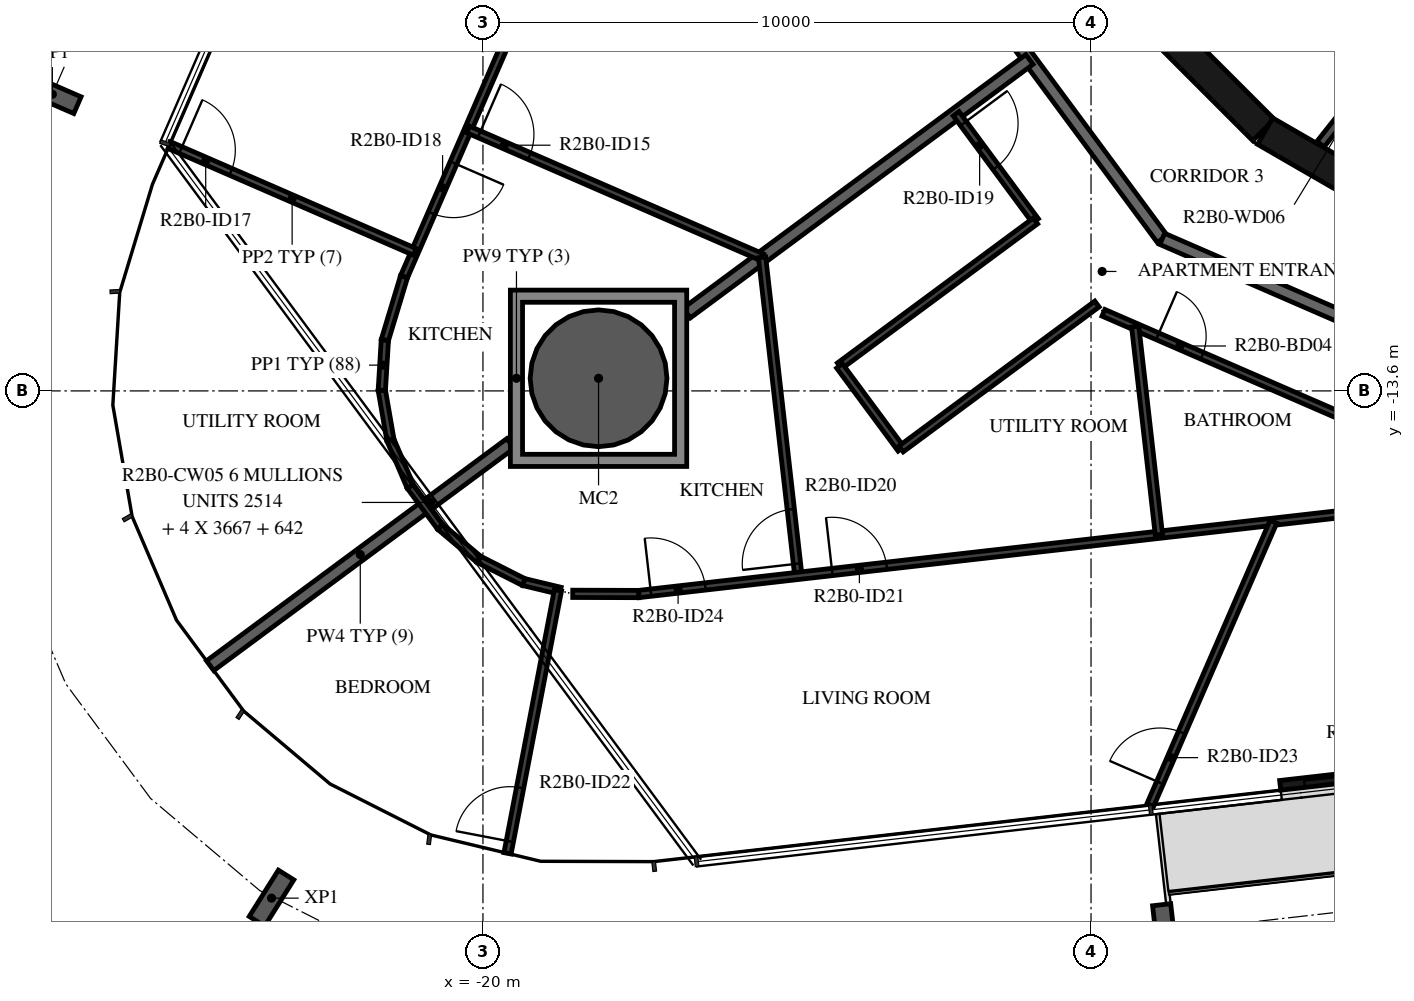
"""IFC4 building model, lengths in metres.
Left out: names, types, materials, properties, quantities, classifications, styles, units other than length and angle.
Written with IfcOpenShell. Run it as: python <this file> out.ifc"""

import sys

from ifc_helpers import new_model, si_unit, direction, frame, frame_2d, origin, origin_2d, place, context, subcontext, project, spatial, polyline, rectangle, hollow_circle, i_section, outline, extrude, element, fill, save


model = new_model("IFC4")
c1 = context("Model", 3, precision=1e-05, world=origin(), true_north=direction((0.0, 1.0)))
c2 = subcontext(c1, "Body", "Model", "MODEL_VIEW")
j1 = project(units=[si_unit("LENGTHUNIT", "METRE"), si_unit("PLANEANGLEUNIT", "RADIAN")], contexts=[c1])
p1 = place(None, origin())
s1 = spatial("IfcSite", under=j1, at=p1, CompositionType="ELEMENT")
p2 = place(p1, origin())
s2 = spatial("IfcBuilding", under=s1, at=p2, CompositionType="ELEMENT")
p3 = place(p2, frame((0.0, 0.0, 90.7)))
s3 = spatial("IfcBuildingStorey", under=s2, at=p3, CompositionType="ELEMENT", Elevation=90.7)
p4 = place(p3, frame((-18.099, -13.393, -0.38), z_axis=(0.0, 0.0, 1.0), x_axis=(1.0, 0.0, 0.0)))
e1 = element("IfcColumn", 1, at=p4, inside=s3, PredefinedType="COLUMN", context=c2, shape_type="SweptSolid", body=[
    extrude(hollow_circle(Radius=1.125, WallThickness=0.055, at=origin_2d()), origin(), (0.0, 0.0, 1.0), 3.5),
])
for number, where, z_axis, x_axis in (
    (2, (-27.081, -8.722, -0.38), (0.0, 0.0, 1.0), (0.399, 0.917, 0.0)),
    (3, (-23.477, -21.941, -0.38), (0.0, 0.0, 1.0), (-0.846, 0.532, 0.0)),
    (4, (-8.788, -22.497, -0.38), (0.0, 0.0, 1.0), (-0.994, -0.113, 0.0)),
):
    element("IfcColumn", number, at=place(p3, frame(where, z_axis=z_axis, x_axis=x_axis)), inside=s3, PredefinedType="COLUMN", context=c2, shape_type="SweptSolid", body=[
        extrude(i_section(OverallWidth=0.3, OverallDepth=0.9, WebThickness=0.019, FlangeThickness=0.035, FilletRadius=0.03, at=origin_2d()), origin(), (0.0, 0.0, 1.0), 3.5),
    ])
p5 = place(p3, frame((-6.889, -20.086, 0.0), z_axis=(0.0, 0.0, 1.0), x_axis=(0.993578576686, 0.113144208648, 0.0)))
e5 = element("IfcWall", 5, at=p5, inside=s3, PredefinedType="STANDARD", context=c2, shape_type="SweptSolid", body=[
    extrude(rectangle(XDim=3.2, YDim=0.16, at=frame_2d((1.6, 0.0))), origin(), (0.0, 0.0, 1.0), 3.12),
])
p6 = place(p5, frame((0.4, 0.0, 0.0)))
e6 = element("IfcOpeningElement", 6, at=p6, cuts=e5, PredefinedType="OPENING", context=c2, shape_type="SweptSolid", body=[
    extrude(rectangle(XDim=2.4, YDim=2.4, at=frame_2d((1.2, 1.2))), frame((0.0, 0.09, 0.0), z_axis=(0.0, -1.0, 0.0), x_axis=(1.0, 0.0, 0.0)), (0.0, 0.0, 1.0), 0.18),
])
p7 = place(p3, frame((-9.308, -7.164, 0.0), z_axis=(0.0, 0.0, 1.0), x_axis=(0.707106781187, -0.707106781187, 0.0)))
e7 = element("IfcWall", 7, at=p7, inside=s3, PredefinedType="SHEAR", context=c2, shape_type="SweptSolid", body=[
    extrude(rectangle(XDim=3.032, YDim=0.5, at=frame_2d((1.516, 0.0))), origin(), (0.0, 0.0, 1.0), 3.12),
])
p8 = place(p3, frame((-7.137, -9.329, 0.0), z_axis=(0.0, 0.0, 1.0), x_axis=(0.865975092491, -0.500087131594, 0.0)))
e8 = element("IfcWall", 8, at=p8, inside=s3, PredefinedType="SHEAR", context=c2, shape_type="SweptSolid", body=[
    extrude(rectangle(XDim=3.033, YDim=0.5, at=frame_2d((1.516, 0.0))), origin(), (0.0, 0.0, 1.0), 3.12),
])
p9 = place(p3, frame((-4.706, -7.625, 0.0), z_axis=(0.0, 0.0, 1.0), x_axis=(-0.621392599334, -0.783499353856, 0.0)))
e9 = element("IfcWall", 9, at=p9, inside=s3, PredefinedType="PARTITIONING", context=c2, shape_type="SweptSolid", body=[
    extrude(rectangle(XDim=2.447, YDim=0.15, at=frame_2d((1.224, 0.0))), origin(), (0.0, 0.0, 1.0), 3.12),
])
p10 = place(p9, frame((0.774, 0.0, 0.0)))
e10 = element("IfcOpeningElement", 10, at=p10, cuts=e9, PredefinedType="OPENING", context=c2, shape_type="SweptSolid", body=[
    extrude(rectangle(XDim=0.9, YDim=2.1, at=frame_2d((0.45, 1.05))), frame((0.0, 0.085, 0.0), z_axis=(0.0, -1.0, 0.0), x_axis=(1.0, 0.0, 0.0)), (0.0, 0.0, 1.0), 0.17),
])
p11 = place(p3, frame((-13.196, -5.198, 0.0), z_axis=(0.0, 0.0, 1.0), x_axis=(0.594805187394, -0.803869883159, 0.0)))
e11 = element("IfcWall", 11, at=p11, inside=s3, PredefinedType="STANDARD", context=c2, shape_type="SweptSolid", body=[
    extrude(rectangle(XDim=7.342, YDim=0.2, at=frame_2d((3.671, 0.0))), origin(), (0.0, 0.0, 1.0), 3.12),
])
p12 = place(p3, frame((-8.829, -11.1, 0.0), z_axis=(0.0, 0.0, 1.0), x_axis=(0.917063622491, -0.398740908742, 0.0)))
e12 = element("IfcWall", 12, at=p12, inside=s3, PredefinedType="STANDARD", context=c2, shape_type="SweptSolid", body=[
    extrude(rectangle(XDim=7.24, YDim=0.2, at=frame_2d((3.62, 0.0))), origin(), (0.0, 0.0, 1.0), 3.12),
])
p13 = place(p12, frame((6.04, 0.0, 0.0)))
e13 = element("IfcOpeningElement", 13, at=p13, cuts=e12, PredefinedType="OPENING", context=c2, shape_type="SweptSolid", body=[
    extrude(rectangle(XDim=1.0, YDim=2.1, at=frame_2d((0.5, 1.05))), frame((0.0, 0.11, 0.0), z_axis=(0.0, -1.0, 0.0), x_axis=(1.0, 0.0, 0.0)), (0.0, 0.0, 1.0), 0.22),
])
p14 = place(p3, frame((-16.649, -12.32, 0.0), z_axis=(0.0, 0.0, 1.0), x_axis=(0.803869204071, 0.594806105169, 0.0)))
e14 = element("IfcWall", 14, at=p14, inside=s3, PredefinedType="STANDARD", context=c2, shape_type="SweptSolid", body=[
    extrude(rectangle(XDim=7.011, YDim=0.2, at=frame_2d((3.506, 0.0))), origin(), (0.0, 0.0, 1.0), 3.12),
])
p15 = place(p3, frame((-24.486, -18.119, 0.0), z_axis=(0.0, 0.0, 1.0), x_axis=(0.80384227933, 0.594842491726, 0.0)))
e15 = element("IfcWall", 15, at=p15, inside=s3, PredefinedType="STANDARD", context=c2, shape_type="SweptSolid", body=[
    extrude(rectangle(XDim=6.142, YDim=0.2, at=frame_2d((3.071, 0.0))), origin(), (0.0, 0.0, 1.0), 3.12),
])
p16 = place(p3, frame((-17.109, -2.089, 0.0), z_axis=(0.0, 0.0, 1.0), x_axis=(-0.398743957683, -0.9170622968, 0.0)))
e16 = element("IfcWall", 16, at=p16, inside=s3, PredefinedType="PARTITIONING", context=c2, shape_type="SweptSolid", body=[
    extrude(rectangle(XDim=10.505, YDim=0.12, at=frame_2d((5.252, 0.0))), origin(), (0.0, 0.0, 1.0), 3.12),
])
p17 = place(p16, frame((2.056, 0.0, 0.0)))
e17 = element("IfcOpeningElement", 17, at=p17, cuts=e16, PredefinedType="OPENING", context=c2, shape_type="SweptSolid", body=[
    extrude(rectangle(XDim=0.9, YDim=2.1, at=frame_2d((0.45, 1.05))), frame((0.0, 0.07, 0.0), z_axis=(0.0, -1.0, 0.0), x_axis=(1.0, 0.0, 0.0)), (0.0, 0.0, 1.0), 0.14),
])
p18 = place(p16, frame((8.464, 0.0, 0.0)))
e18 = element("IfcOpeningElement", 18, at=p18, cuts=e16, PredefinedType="OPENING", context=c2, shape_type="SweptSolid", body=[
    extrude(rectangle(XDim=0.9, YDim=2.1, at=frame_2d((0.45, 1.05))), frame((0.0, 0.07, 0.0), z_axis=(0.0, -1.0, 0.0), x_axis=(1.0, 0.0, 0.0)), (0.0, 0.0, 1.0), 0.14),
])
p19 = place(p3, frame((-20.245, -9.3, 0.0), z_axis=(0.0, 0.0, 1.0), x_axis=(0.91706784774, -0.398731190956, 0.0)))
e19 = element("IfcWall", 19, at=p19, inside=s3, PredefinedType="PARTITIONING", context=c2, shape_type="SweptSolid", body=[
    extrude(rectangle(XDim=5.272, YDim=0.12, at=frame_2d((2.636, 0.0))), origin(), (0.0, 0.0, 1.0), 3.12),
])
p20 = place(p19, frame((0.2, 0.0, 0.0)))
e20 = element("IfcOpeningElement", 20, at=p20, cuts=e19, PredefinedType="OPENING", context=c2, shape_type="SweptSolid", body=[
    extrude(rectangle(XDim=0.9, YDim=2.1, at=frame_2d((0.45, 1.05))), frame((0.0, 0.07, 0.0), z_axis=(0.0, -1.0, 0.0), x_axis=(1.0, 0.0, 0.0)), (0.0, 0.0, 1.0), 0.14),
])
p21 = place(p3, frame((-25.156, -9.559, 0.0), z_axis=(0.0, 0.0, 1.0), x_axis=(0.917042707292, -0.398789008127, 0.0)))
e21 = element("IfcWall", 21, at=p21, inside=s3, PredefinedType="PARTITIONING", context=c2, shape_type="SweptSolid", body=[
    extrude(rectangle(XDim=4.4, YDim=0.12, at=frame_2d((2.2, 0.0))), origin(), (0.0, 0.0, 1.0), 2.73),
])
p22 = place(p21, frame((0.2, 0.0, 0.0)))
e22 = element("IfcOpeningElement", 22, at=p22, cuts=e21, PredefinedType="OPENING", context=c2, shape_type="SweptSolid", body=[
    extrude(rectangle(XDim=0.9, YDim=2.1, at=frame_2d((0.45, 1.05))), frame((0.0, 0.07, 0.0), z_axis=(0.0, -1.0, 0.0), x_axis=(1.0, 0.0, 0.0)), (0.0, 0.0, 1.0), 0.14),
])
for number, where, z_axis, x_axis in (
    (23, (-20.703, -15.835, 0.0), (0.0, 0.0, 1.0), (-0.595, 0.804, 0.0)),
    (24, (-21.196, -15.168, 0.0), (0.0, 0.0, 1.0), (-0.394, 0.919, 0.0)),
):
    element("IfcWall", number, at=place(p3, frame(where, z_axis=z_axis, x_axis=x_axis)), inside=s3, PredefinedType="PARTITIONING", context=c2, shape_type="SweptSolid", body=[
        extrude(rectangle(XDim=0.829, YDim=0.12, at=frame_2d((0.415, 0.0))), origin(), (0.0, 0.0, 1.0), 3.12),
    ])
p23 = place(p3, frame((-21.522, -14.406, 0.0), z_axis=(0.0, 0.0, 1.0), x_axis=(-0.170794347099, 0.985306698952, 0.0)))
e25 = element("IfcWall", 25, at=p23, inside=s3, PredefinedType="PARTITIONING", context=c2, shape_type="SweptSolid", body=[
    extrude(rectangle(XDim=0.829, YDim=0.12, at=frame_2d((0.415, 0.0))), origin(), (0.0, 0.0, 1.0), 3.12),
])
p24 = place(p3, frame((-21.664, -13.59, 0.0), z_axis=(0.0, 0.0, 1.0), x_axis=(0.061277779288, 0.998120751095, 0.0)))
e26 = element("IfcWall", 26, at=p24, inside=s3, PredefinedType="PARTITIONING", context=c2, shape_type="SweptSolid", body=[
    extrude(rectangle(XDim=0.829, YDim=0.12, at=frame_2d((0.414, 0.0))), origin(), (0.0, 0.0, 1.0), 3.12),
])
p25 = place(p3, frame((-21.613, -12.762, 0.0), z_axis=(0.0, 0.0, 1.0), x_axis=(0.289552239308, 0.95716221233, 0.0)))
e27 = element("IfcWall", 27, at=p25, inside=s3, PredefinedType="PARTITIONING", context=c2, shape_type="SweptSolid", body=[
    extrude(rectangle(XDim=1.087, YDim=0.12, at=frame_2d((0.543, 0.0))), origin(), (0.0, 0.0, 1.0), 3.12),
])
p26 = place(p3, frame((-12.219, -9.041, 0.0), z_axis=(0.0, 0.0, 1.0), x_axis=(0.59482286703, -0.803856801214, 0.0)))
e28 = element("IfcWall", 28, at=p26, inside=s3, PredefinedType="PARTITIONING", context=c2, shape_type="SweptSolid", body=[
    extrude(rectangle(XDim=2.193, YDim=0.12, at=frame_2d((1.097, 0.0))), origin(), (0.0, 0.0, 1.0), 3.12),
])
p27 = place(p26, frame((0.2, 0.0, 0.0)))
e29 = element("IfcOpeningElement", 29, at=p27, cuts=e28, PredefinedType="OPENING", context=c2, shape_type="SweptSolid", body=[
    extrude(rectangle(XDim=0.9, YDim=2.1, at=frame_2d((0.45, 1.05))), frame((0.0, 0.07, 0.0), z_axis=(0.0, -1.0, 0.0), x_axis=(1.0, 0.0, 0.0)), (0.0, 0.0, 1.0), 0.14),
])
p28 = place(p3, frame((-10.914, -10.804, 0.0), z_axis=(0.0, 0.0, 1.0), x_axis=(-0.803864616889, -0.594812304609, 0.0)))
e30 = element("IfcWall", 30, at=p28, inside=s3, PredefinedType="PARTITIONING", context=c2, shape_type="SweptSolid", body=[
    extrude(rectangle(XDim=4.008, YDim=0.12, at=frame_2d((2.004, 0.0))), origin(), (0.0, 0.0, 1.0), 3.12),
])
p29 = place(p3, frame((-14.136, -13.188, 0.0), z_axis=(0.0, 0.0, 1.0), x_axis=(0.594863421241, -0.803826791087, 0.0)))
e31 = element("IfcWall", 31, at=p29, inside=s3, PredefinedType="PARTITIONING", context=c2, shape_type="SweptSolid", body=[
    extrude(rectangle(XDim=1.7, YDim=0.12, at=frame_2d((0.85, 0.0))), origin(), (0.0, 0.0, 1.0), 3.12),
])
p30 = place(p3, frame((-13.125, -14.555, 0.0), z_axis=(0.0, 0.0, 1.0), x_axis=(0.80389374229, 0.594772940799, 0.0)))
e32 = element("IfcWall", 32, at=p30, inside=s3, PredefinedType="PARTITIONING", context=c2, shape_type="SweptSolid", body=[
    extrude(rectangle(XDim=4.008, YDim=0.12, at=frame_2d((2.004, 0.0))), origin(), (0.0, 0.0, 1.0), 3.12),
])
p31 = place(p3, frame((-9.796, -12.315, 0.0), z_axis=(0.0, 0.0, 1.0), x_axis=(0.917059572812, -0.398750222463, 0.0)))
e33 = element("IfcWall", 33, at=p31, inside=s3, PredefinedType="PARTITIONING", context=c2, shape_type="SweptSolid", body=[
    extrude(rectangle(XDim=8.146, YDim=0.12, at=frame_2d((4.073, 0.0))), origin(), (0.0, 0.0, 1.0), 3.12),
])
p32 = place(p31, frame((0.969, 0.0, 0.0)))
e34 = element("IfcOpeningElement", 34, at=p32, cuts=e33, PredefinedType="OPENING", context=c2, shape_type="SweptSolid", body=[
    extrude(rectangle(XDim=0.8, YDim=2.1, at=frame_2d((0.4, 1.05))), frame((0.0, 0.07, 0.0), z_axis=(0.0, -1.0, 0.0), x_axis=(1.0, 0.0, 0.0)), (0.0, 0.0, 1.0), 0.14),
])
p33 = place(p3, frame((-18.728, -16.888, 0.0), z_axis=(0.0, 0.0, 1.0), x_axis=(-0.972351484507, 0.233522141512, 0.0)))
e35 = element("IfcWall", 35, at=p33, inside=s3, PredefinedType="PARTITIONING", context=c2, shape_type="SweptSolid", body=[
    extrude(rectangle(XDim=0.619, YDim=0.12, at=frame_2d((0.31, 0.0))), origin(), (0.0, 0.0, 1.0), 3.12),
])
for number, where, z_axis, x_axis in (
    (36, (-19.33, -16.744, 0.0), (0.0, 0.0, 1.0), (-0.892, 0.451, 0.0)),
    (37, (-20.069, -16.369, 0.0), (0.0, 0.0, 1.0), (-0.764, 0.645, 0.0)),
):
    element("IfcWall", number, at=place(p3, frame(where, z_axis=z_axis, x_axis=x_axis)), inside=s3, PredefinedType="PARTITIONING", context=c2, shape_type="SweptSolid", body=[
        extrude(rectangle(XDim=0.829, YDim=0.12, at=frame_2d((0.415, 0.0))), origin(), (0.0, 0.0, 1.0), 3.12),
    ])
p34 = place(p3, frame((-19.596, -21.205, 0.0), z_axis=(0.0, 0.0, 1.0), x_axis=(0.188168961647, 0.982136671687, 0.0)))
e38 = element("IfcWall", 38, at=p34, inside=s3, PredefinedType="PARTITIONING", context=c2, shape_type="SweptSolid", body=[
    extrude(rectangle(XDim=4.405, YDim=0.12, at=frame_2d((2.202, 0.0))), origin(), (0.0, 0.0, 1.0), 3.12),
])
p35 = place(p34, frame((0.2, 0.0, 0.0)))
e39 = element("IfcOpeningElement", 39, at=p35, cuts=e38, PredefinedType="OPENING", context=c2, shape_type="SweptSolid", body=[
    extrude(rectangle(XDim=0.9, YDim=2.1, at=frame_2d((0.45, 1.05))), frame((0.0, 0.07, 0.0), z_axis=(0.0, -1.0, 0.0), x_axis=(1.0, 0.0, 0.0)), (0.0, 0.0, 1.0), 0.14),
])
p36 = place(p3, frame((-14.813, -16.641, 0.0), z_axis=(0.0, 0.0, 1.0), x_axis=(-0.113210971478, 0.993570971767, 0.0)))
e40 = element("IfcWall", 40, at=p36, inside=s3, PredefinedType="PARTITIONING", context=c2, shape_type="SweptSolid", body=[
    extrude(rectangle(XDim=5.273, YDim=0.12, at=frame_2d((2.636, 0.0))), origin(), (0.0, 0.0, 1.0), 3.12),
])
p37 = place(p36, frame((0.2, 0.0, 0.0)))
e41 = element("IfcOpeningElement", 41, at=p37, cuts=e40, PredefinedType="OPENING", context=c2, shape_type="SweptSolid", body=[
    extrude(rectangle(XDim=0.9, YDim=2.1, at=frame_2d((0.45, 1.05))), frame((0.0, 0.07, 0.0), z_axis=(0.0, -1.0, 0.0), x_axis=(1.0, 0.0, 0.0)), (0.0, 0.0, 1.0), 0.14),
])
p38 = place(p3, frame((-18.524, -16.937, 0.0), z_axis=(0.0, 0.0, 1.0), x_axis=(0.999995736722, -0.00292002349, 0.0)))
e42 = element("IfcWall", 42, at=p38, inside=s3, PredefinedType="PARTITIONING", context=c2, shape_type="SweptSolid", body=[
    extrude(rectangle(XDim=1.087, YDim=0.12, at=frame_2d((0.543, 0.0))), origin(), (0.0, 0.0, 1.0), 3.12),
])
p39 = place(p3, frame((-17.437, -16.94, 0.0), z_axis=(0.0, 0.0, 1.0), x_axis=(0.993573314119, 0.113190412448, 0.0)))
e43 = element("IfcWall", 43, at=p39, inside=s3, PredefinedType="PARTITIONING", context=c2, shape_type="SweptSolid", body=[
    extrude(rectangle(XDim=14.576, YDim=0.12, at=frame_2d((7.288, 0.0))), origin(), (0.0, 0.0, 1.0), 3.12),
])
p40 = place(p39, frame((3.201, 0.0, 0.0)))
e44 = element("IfcOpeningElement", 44, at=p40, cuts=e43, PredefinedType="OPENING", context=c2, shape_type="SweptSolid", body=[
    extrude(rectangle(XDim=0.9, YDim=2.1, at=frame_2d((0.45, 1.05))), frame((0.0, 0.07, 0.0), z_axis=(0.0, -1.0, 0.0), x_axis=(1.0, 0.0, 0.0)), (0.0, 0.0, 1.0), 0.14),
])
p41 = place(p39, frame((0.2, 0.0, 0.0)))
e45 = element("IfcOpeningElement", 45, at=p41, cuts=e43, PredefinedType="OPENING", context=c2, shape_type="SweptSolid", body=[
    extrude(rectangle(XDim=0.9, YDim=2.1, at=frame_2d((0.45, 1.05))), frame((0.0, 0.07, 0.0), z_axis=(0.0, -1.0, 0.0), x_axis=(1.0, 0.0, 0.0)), (0.0, 0.0, 1.0), 0.14),
])
p42 = place(p3, frame((-8.884, -15.966, 0.0), z_axis=(0.0, 0.0, 1.0), x_axis=(-0.113230836929, 0.993568708026, 0.0)))
e46 = element("IfcWall", 46, at=p42, inside=s3, PredefinedType="PARTITIONING", context=c2, shape_type="SweptSolid", body=[
    extrude(rectangle(XDim=3.446, YDim=0.12, at=frame_2d((1.723, 0.0))), origin(), (0.0, 0.0, 1.0), 3.12),
])
p43 = place(p3, frame((-9.026, -20.41, 0.0), z_axis=(0.0, 0.0, 1.0), x_axis=(0.398750711167, 0.917059360316, 0.0)))
e47 = element("IfcWall", 47, at=p43, inside=s3, PredefinedType="PARTITIONING", context=c2, shape_type="SweptSolid", body=[
    extrude(rectangle(XDim=5.081, YDim=0.12, at=frame_2d((2.54, 0.0))), origin(), (0.0, 0.0, 1.0), 3.12),
])
p44 = place(p43, frame((0.4, 0.0, 0.0)))
e48 = element("IfcOpeningElement", 48, at=p44, cuts=e47, PredefinedType="OPENING", context=c2, shape_type="SweptSolid", body=[
    extrude(rectangle(XDim=0.9, YDim=2.1, at=frame_2d((0.45, 1.05))), frame((0.0, 0.07, 0.0), z_axis=(0.0, -1.0, 0.0), x_axis=(1.0, 0.0, 0.0)), (0.0, 0.0, 1.0), 0.14),
])
p45 = place(p3, origin())
e49 = element("IfcWall", 49, at=p45, inside=s3, PredefinedType="STANDARD", context=c2, shape_type="SweptSolid", body=[
    extrude(outline(polyline([(-16.649, -11.942), (-16.649, -14.843), (-19.549, -14.843), (-19.549, -11.942), (-16.649, -11.942)]), holes=[polyline([(-19.349, -14.643), (-16.849, -14.643), (-16.849, -12.143), (-19.349, -12.143), (-19.349, -14.643)])]), origin(), (0.0, 0.0, 1.0), 3.12),
])
p46 = place(p6, origin())
e50 = element("IfcDoor", 50, at=p46, inside=s3, OperationType="DOUBLE_DOOR_SLIDING", PredefinedType="DOOR", context=c2, shape_type="SweptSolid", body=[
    extrude(rectangle(XDim=2.4, YDim=2.4, at=frame_2d((1.2, 1.2))), frame((0.0, 0.025, 0.0), z_axis=(0.0, -1.0, 0.0), x_axis=(1.0, 0.0, 0.0)), (0.0, 0.0, 1.0), 0.05),
])
fill(e6, e50)
p47 = place(p20, origin())
e51 = element("IfcDoor", 51, at=p47, inside=s3, OperationType="SINGLE_SWING_RIGHT", PredefinedType="DOOR", context=c2, shape_type="SweptSolid", body=[
    extrude(rectangle(XDim=0.9, YDim=2.1, at=frame_2d((0.45, 1.05))), frame((0.0, 0.025, 0.0), z_axis=(0.0, -1.0, 0.0), x_axis=(1.0, 0.0, 0.0)), (0.0, 0.0, 1.0), 0.05),
])
fill(e20, e51)
p48 = place(p22, origin())
e52 = element("IfcDoor", 52, at=p48, inside=s3, OperationType="SINGLE_SWING_RIGHT", PredefinedType="DOOR", context=c2, shape_type="SweptSolid", body=[
    extrude(rectangle(XDim=0.9, YDim=2.1, at=frame_2d((0.45, 1.05))), frame((0.0, 0.025, 0.0), z_axis=(0.0, -1.0, 0.0), x_axis=(1.0, 0.0, 0.0)), (0.0, 0.0, 1.0), 0.05),
])
fill(e22, e52)
p49 = place(p18, origin())
e53 = element("IfcDoor", 53, at=p49, inside=s3, OperationType="SINGLE_SWING_LEFT", PredefinedType="DOOR", context=c2, shape_type="SweptSolid", body=[
    extrude(rectangle(XDim=0.9, YDim=2.1, at=frame_2d((0.45, 1.05))), frame((0.0, 0.025, 0.0), z_axis=(0.0, -1.0, 0.0), x_axis=(1.0, 0.0, 0.0)), (0.0, 0.0, 1.0), 0.05),
])
fill(e18, e53)
p50 = place(p27, origin())
e54 = element("IfcDoor", 54, at=p50, inside=s3, OperationType="SINGLE_SWING_LEFT", PredefinedType="DOOR", context=c2, shape_type="SweptSolid", body=[
    extrude(rectangle(XDim=0.9, YDim=2.1, at=frame_2d((0.45, 1.05))), frame((0.0, 0.025, 0.0), z_axis=(0.0, -1.0, 0.0), x_axis=(1.0, 0.0, 0.0)), (0.0, 0.0, 1.0), 0.05),
])
fill(e29, e54)
p51 = place(p32, origin())
e55 = element("IfcDoor", 55, at=p51, inside=s3, OperationType="SINGLE_SWING_LEFT", PredefinedType="DOOR", context=c2, shape_type="SweptSolid", body=[
    extrude(rectangle(XDim=0.8, YDim=2.1, at=frame_2d((0.4, 1.05))), frame((0.0, 0.025, 0.0), z_axis=(0.0, -1.0, 0.0), x_axis=(1.0, 0.0, 0.0)), (0.0, 0.0, 1.0), 0.05),
])
fill(e34, e55)
p52 = place(p37, origin())
e56 = element("IfcDoor", 56, at=p52, inside=s3, OperationType="SINGLE_SWING_LEFT", PredefinedType="DOOR", context=c2, shape_type="SweptSolid", body=[
    extrude(rectangle(XDim=0.9, YDim=2.1, at=frame_2d((0.45, 1.05))), frame((0.0, 0.025, 0.0), z_axis=(0.0, -1.0, 0.0), x_axis=(1.0, 0.0, 0.0)), (0.0, 0.0, 1.0), 0.05),
])
fill(e41, e56)
p53 = place(p40, origin())
e57 = element("IfcDoor", 57, at=p53, inside=s3, OperationType="SINGLE_SWING_LEFT", PredefinedType="DOOR", context=c2, shape_type="SweptSolid", body=[
    extrude(rectangle(XDim=0.9, YDim=2.1, at=frame_2d((0.45, 1.05))), frame((0.0, 0.025, 0.0), z_axis=(0.0, -1.0, 0.0), x_axis=(1.0, 0.0, 0.0)), (0.0, 0.0, 1.0), 0.05),
])
fill(e44, e57)
p54 = place(p35, origin())
e58 = element("IfcDoor", 58, at=p54, inside=s3, OperationType="SINGLE_SWING_LEFT", PredefinedType="DOOR", context=c2, shape_type="SweptSolid", body=[
    extrude(rectangle(XDim=0.9, YDim=2.1, at=frame_2d((0.45, 1.05))), frame((0.0, 0.025, 0.0), z_axis=(0.0, -1.0, 0.0), x_axis=(1.0, 0.0, 0.0)), (0.0, 0.0, 1.0), 0.05),
])
fill(e39, e58)
p55 = place(p44, origin())
e59 = element("IfcDoor", 59, at=p55, inside=s3, OperationType="SINGLE_SWING_RIGHT", PredefinedType="DOOR", context=c2, shape_type="SweptSolid", body=[
    extrude(rectangle(XDim=0.9, YDim=2.1, at=frame_2d((0.45, 1.05))), frame((0.0, 0.025, 0.0), z_axis=(0.0, -1.0, 0.0), x_axis=(1.0, 0.0, 0.0)), (0.0, 0.0, 1.0), 0.05),
])
fill(e48, e59)
p56 = place(p41, origin())
e60 = element("IfcDoor", 60, at=p56, inside=s3, OperationType="SINGLE_SWING_LEFT", PredefinedType="DOOR", context=c2, shape_type="SweptSolid", body=[
    extrude(rectangle(XDim=0.9, YDim=2.1, at=frame_2d((0.45, 1.05))), frame((0.0, 0.025, 0.0), z_axis=(0.0, -1.0, 0.0), x_axis=(1.0, 0.0, 0.0)), (0.0, 0.0, 1.0), 0.05),
])
fill(e45, e60)
save(model, sys.argv[1])
